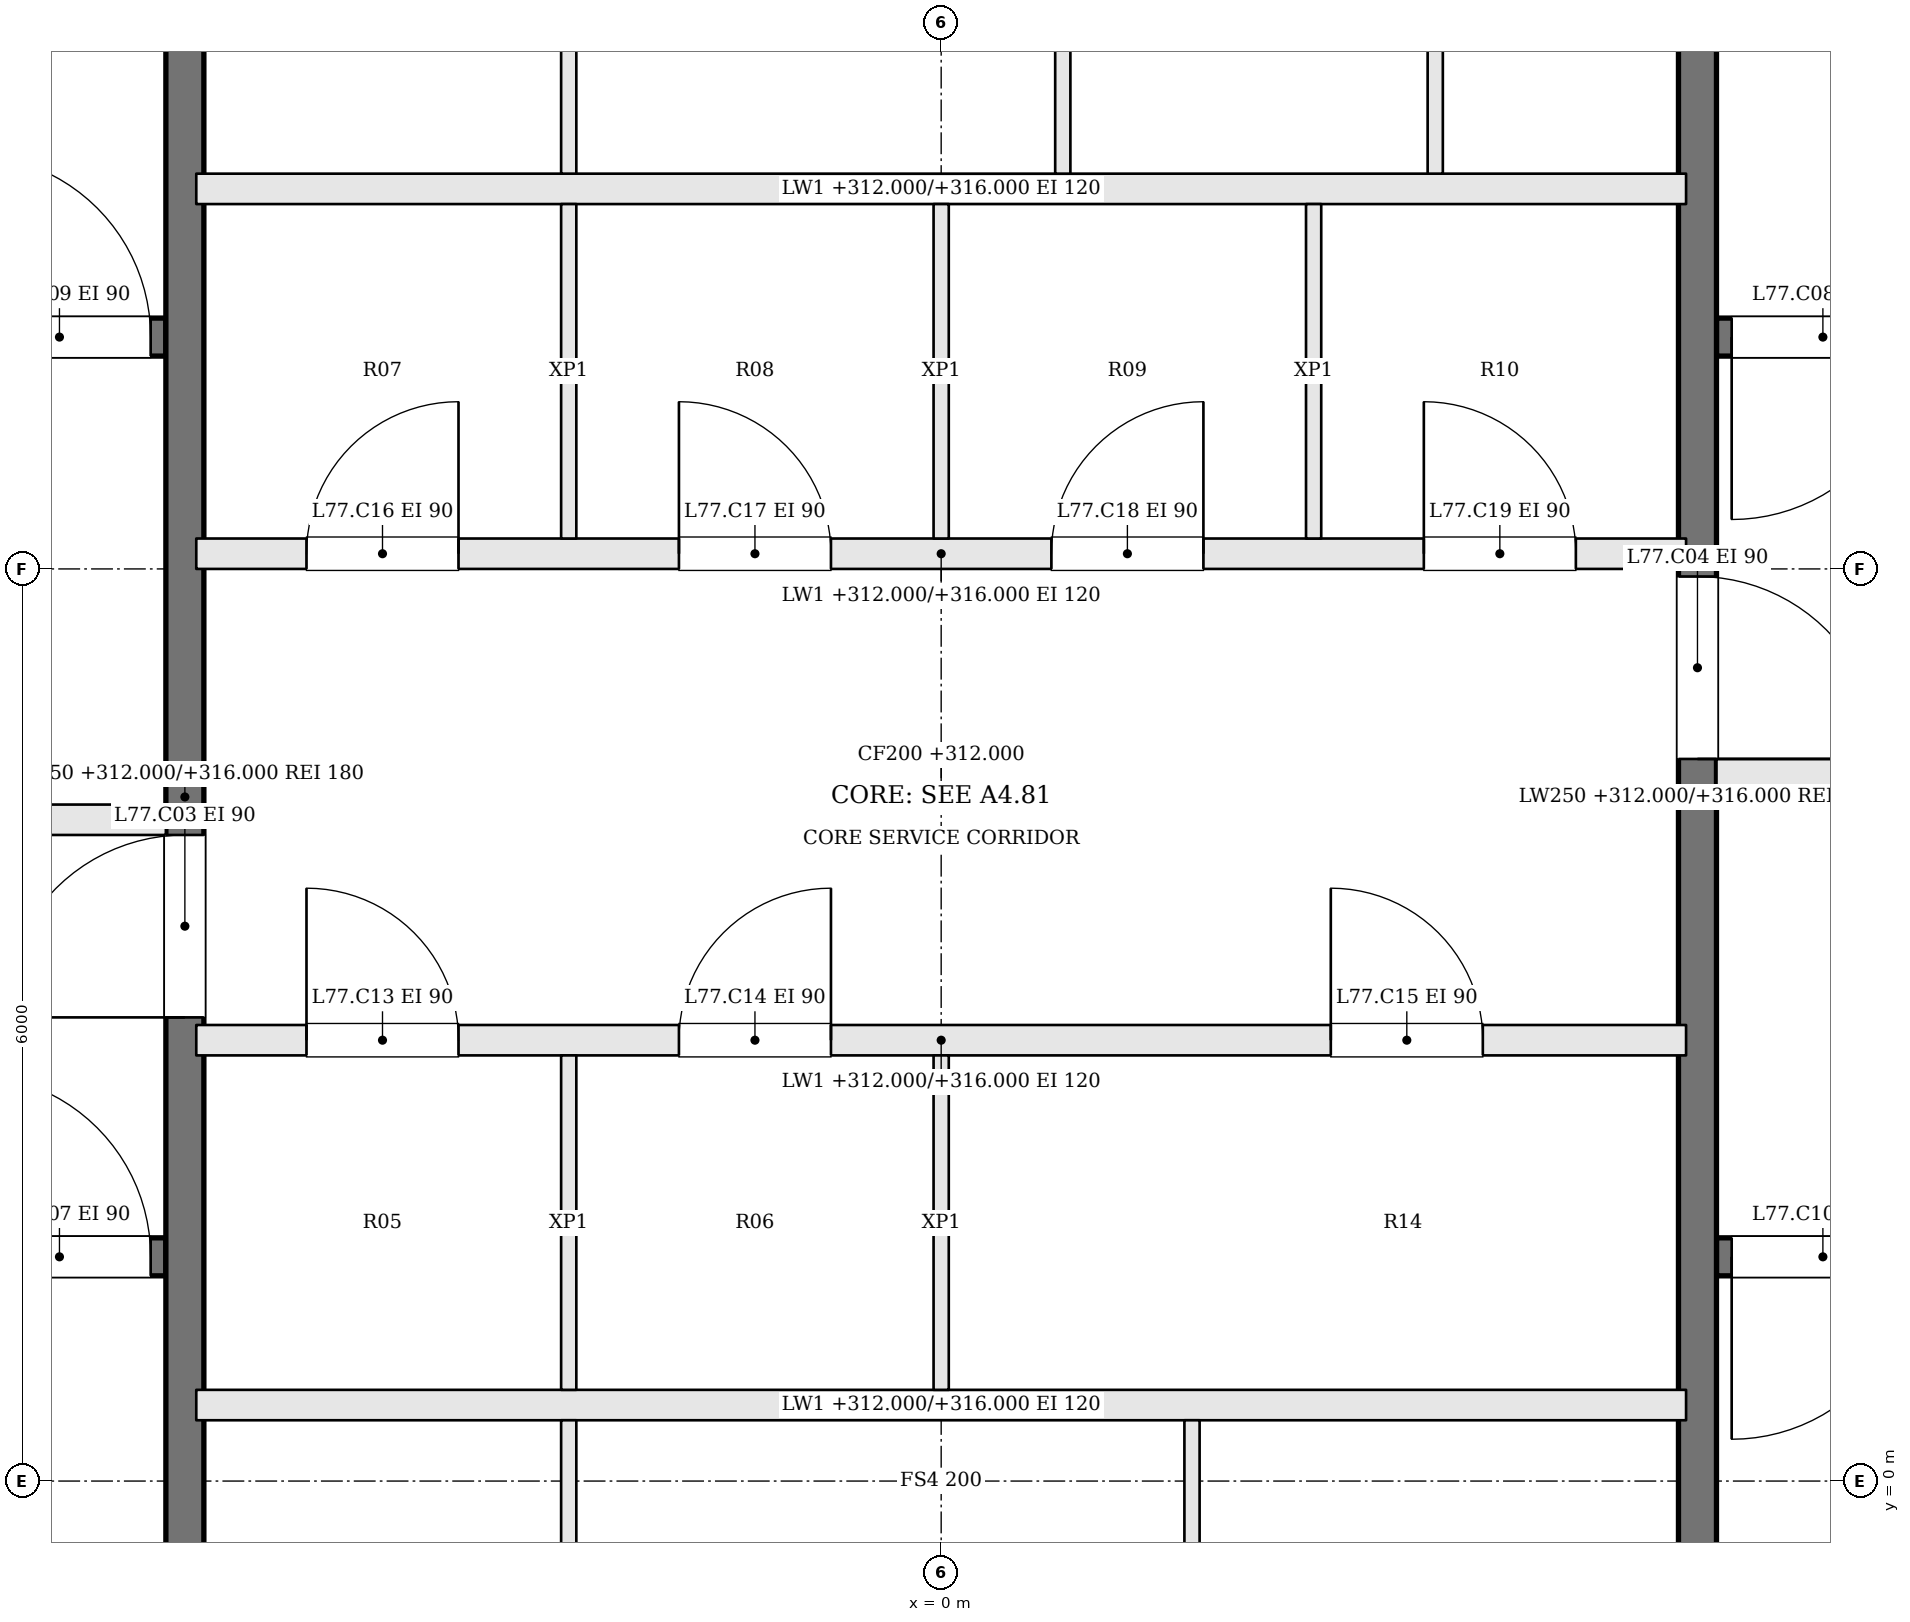
"""IFC4 building model, lengths in metres.
Left out: names, types, materials, properties, quantities, classifications, styles, units other than length and angle.
Written with IfcOpenShell. Run it as: python <this file> out.ifc"""

import sys

from ifc_helpers import new_model, si_unit, direction, frame, frame_2d, origin, place, context, subcontext, project, spatial, rectangle, extrude, element, fill, save


model = new_model("IFC4")
c1 = context("Model", 3, precision=1e-05, world=origin(), true_north=direction((0.0, 1.0)))
c2 = subcontext(c1, "Body", "Model", "MODEL_VIEW")
j1 = project(units=[si_unit("LENGTHUNIT", "METRE"), si_unit("PLANEANGLEUNIT", "RADIAN")], contexts=[c1])
p1 = place(None, origin())
s1 = spatial("IfcSite", under=j1, at=p1, CompositionType="ELEMENT")
p2 = place(p1, origin())
s2 = spatial("IfcBuilding", under=s1, at=p2, CompositionType="ELEMENT")
p3 = place(p2, frame((0.0, 0.0, 312.0)))
s3 = spatial("IfcBuildingStorey", under=s2, at=p3, CompositionType="ELEMENT", Elevation=312.0)
p4 = place(p3, frame((-12.2, 1.475, 0.0), z_axis=(0.0, 0.0, 1.0), x_axis=(1.0, 0.0, 0.0)))
e1 = element("IfcWall", 1, at=p4, inside=s3, PredefinedType="SOLIDWALL", context=c2, shape_type="SweptSolid", body=[
    extrude(rectangle(XDim=7.1, YDim=0.25, at=frame_2d((3.55, 0.0))), origin(), (0.0, 0.0, 1.0), 4.0),
])
p5 = place(p4, frame((5.8, 0.0, 0.0)))
e2 = element("IfcOpeningElement", 2, at=p5, cuts=e1, PredefinedType="OPENING", context=c2, shape_type="SweptSolid", body=[
    extrude(rectangle(XDim=1.2, YDim=2.1, at=frame_2d((0.6, 1.05))), frame((0.0, 0.135, 0.0), z_axis=(0.0, -1.0, 0.0), x_axis=(1.0, 0.0, 0.0)), (0.0, 0.0, 1.0), 0.27),
])
p6 = place(p3, frame((12.2, 7.525, 0.0), z_axis=(0.0, 0.0, 1.0), x_axis=(-1.0, 0.0, 0.0)))
e3 = element("IfcWall", 3, at=p6, inside=s3, PredefinedType="SOLIDWALL", context=c2, shape_type="SweptSolid", body=[
    extrude(rectangle(XDim=7.1, YDim=0.25, at=frame_2d((3.55, 0.0))), origin(), (0.0, 0.0, 1.0), 4.0),
])
p7 = place(p6, frame((5.8, 0.0, 0.0)))
e4 = element("IfcOpeningElement", 4, at=p7, cuts=e3, PredefinedType="OPENING", context=c2, shape_type="SweptSolid", body=[
    extrude(rectangle(XDim=1.2, YDim=2.1, at=frame_2d((0.6, 1.05))), frame((0.0, 0.135, 0.0), z_axis=(0.0, -1.0, 0.0), x_axis=(1.0, 0.0, 0.0)), (0.0, 0.0, 1.0), 0.27),
])
p8 = place(p3, frame((-12.2, 4.35, 0.0), z_axis=(0.0, 0.0, 1.0), x_axis=(1.0, 0.0, 0.0)))
e5 = element("IfcWall", 5, at=p8, inside=s3, PredefinedType="SOLIDWALL", context=c2, shape_type="SweptSolid", body=[
    extrude(rectangle(XDim=7.1, YDim=0.2, at=frame_2d((3.55, 0.0))), origin(), (0.0, 0.0, 1.0), 4.0),
])
p9 = place(p8, frame((4.4, 0.0, 0.0)))
e6 = element("IfcOpeningElement", 6, at=p9, cuts=e5, PredefinedType="OPENING", context=c2, shape_type="SweptSolid", body=[
    extrude(rectangle(XDim=1.2, YDim=2.1, at=frame_2d((0.6, 1.05))), frame((0.0, 0.11, 0.0), z_axis=(0.0, -1.0, 0.0), x_axis=(1.0, 0.0, 0.0)), (0.0, 0.0, 1.0), 0.22),
])
p10 = place(p8, frame((1.1, 0.0, 0.0)))
e7 = element("IfcOpeningElement", 7, at=p10, cuts=e5, PredefinedType="OPENING", context=c2, shape_type="SweptSolid", body=[
    extrude(rectangle(XDim=1.2, YDim=2.1, at=frame_2d((0.6, 1.05))), frame((0.0, 0.11, 0.0), z_axis=(0.0, -1.0, 0.0), x_axis=(1.0, 0.0, 0.0)), (0.0, 0.0, 1.0), 0.22),
])
p11 = place(p3, frame((12.2, 4.65, 0.0), z_axis=(0.0, 0.0, 1.0), x_axis=(-1.0, 0.0, 0.0)))
e8 = element("IfcWall", 8, at=p11, inside=s3, PredefinedType="SOLIDWALL", context=c2, shape_type="SweptSolid", body=[
    extrude(rectangle(XDim=7.1, YDim=0.2, at=frame_2d((3.55, 0.0))), origin(), (0.0, 0.0, 1.0), 4.0),
])
p12 = place(p11, frame((4.4, 0.0, 0.0)))
e9 = element("IfcOpeningElement", 9, at=p12, cuts=e8, PredefinedType="OPENING", context=c2, shape_type="SweptSolid", body=[
    extrude(rectangle(XDim=1.2, YDim=2.1, at=frame_2d((0.6, 1.05))), frame((0.0, 0.11, 0.0), z_axis=(0.0, -1.0, 0.0), x_axis=(1.0, 0.0, 0.0)), (0.0, 0.0, 1.0), 0.22),
])
p13 = place(p11, frame((1.1, 0.0, 0.0)))
e10 = element("IfcOpeningElement", 10, at=p13, cuts=e8, PredefinedType="OPENING", context=c2, shape_type="SweptSolid", body=[
    extrude(rectangle(XDim=1.2, YDim=2.1, at=frame_2d((0.6, 1.05))), frame((0.0, 0.11, 0.0), z_axis=(0.0, -1.0, 0.0), x_axis=(1.0, 0.0, 0.0)), (0.0, 0.0, 1.0), 0.22),
])
p14 = place(p3, frame((-12.2, 7.525, 0.0), z_axis=(0.0, 0.0, 1.0), x_axis=(1.0, 0.0, 0.0)))
e11 = element("IfcWall", 11, at=p14, inside=s3, PredefinedType="SOLIDWALL", context=c2, shape_type="SweptSolid", body=[
    extrude(rectangle(XDim=7.1, YDim=0.25, at=frame_2d((3.55, 0.0))), origin(), (0.0, 0.0, 1.0), 4.0),
])
p15 = place(p14, frame((5.8, 0.0, 0.0)))
e12 = element("IfcOpeningElement", 12, at=p15, cuts=e11, PredefinedType="OPENING", context=c2, shape_type="SweptSolid", body=[
    extrude(rectangle(XDim=1.2, YDim=2.1, at=frame_2d((0.6, 1.05))), frame((0.0, 0.135, 0.0), z_axis=(0.0, -1.0, 0.0), x_axis=(1.0, 0.0, 0.0)), (0.0, 0.0, 1.0), 0.27),
])
p16 = place(p3, frame((12.2, 1.475, 0.0), z_axis=(0.0, 0.0, 1.0), x_axis=(-1.0, 0.0, 0.0)))
e13 = element("IfcWall", 13, at=p16, inside=s3, PredefinedType="SOLIDWALL", context=c2, shape_type="SweptSolid", body=[
    extrude(rectangle(XDim=7.1, YDim=0.25, at=frame_2d((3.55, 0.0))), origin(), (0.0, 0.0, 1.0), 4.0),
])
p17 = place(p16, frame((5.8, 0.0, 0.0)))
e14 = element("IfcOpeningElement", 14, at=p17, cuts=e13, PredefinedType="OPENING", context=c2, shape_type="SweptSolid", body=[
    extrude(rectangle(XDim=1.2, YDim=2.1, at=frame_2d((0.6, 1.05))), frame((0.0, 0.135, 0.0), z_axis=(0.0, -1.0, 0.0), x_axis=(1.0, 0.0, 0.0)), (0.0, 0.0, 1.0), 0.27),
])
p18 = place(p3, frame((-4.975, -2.2, 0.0), z_axis=(0.0, 0.0, 1.0), x_axis=(0.0, 1.0, 0.0)))
e15 = element("IfcWall", 15, at=p18, inside=s3, PredefinedType="SOLIDWALL", context=c2, shape_type="SweptSolid", body=[
    extrude(rectangle(XDim=13.4, YDim=0.25, at=frame_2d((6.7, 0.0))), origin(), (0.0, 0.0, 1.0), 4.0),
])
p19 = place(p18, frame((5.25, 0.0, 0.0)))
e16 = element("IfcOpeningElement", 16, at=p19, cuts=e15, PredefinedType="OPENING", context=c2, shape_type="SweptSolid", body=[
    extrude(rectangle(XDim=1.2, YDim=2.1, at=frame_2d((0.6, 1.05))), frame((0.0, 0.135, 0.0), z_axis=(0.0, -1.0, 0.0), x_axis=(1.0, 0.0, 0.0)), (0.0, 0.0, 1.0), 0.27),
])
p20 = place(p3, frame((4.975, 11.2, 0.0), z_axis=(0.0, 0.0, 1.0), x_axis=(0.0, -1.0, 0.0)))
e17 = element("IfcWall", 17, at=p20, inside=s3, PredefinedType="SOLIDWALL", context=c2, shape_type="SweptSolid", body=[
    extrude(rectangle(XDim=13.4, YDim=0.25, at=frame_2d((6.7, 0.0))), origin(), (0.0, 0.0, 1.0), 4.0),
])
p21 = place(p20, frame((5.25, 0.0, 0.0)))
e18 = element("IfcOpeningElement", 18, at=p21, cuts=e17, PredefinedType="OPENING", context=c2, shape_type="SweptSolid", body=[
    extrude(rectangle(XDim=1.2, YDim=2.1, at=frame_2d((0.6, 1.05))), frame((0.0, 0.135, 0.0), z_axis=(0.0, -1.0, 0.0), x_axis=(1.0, 0.0, 0.0)), (0.0, 0.0, 1.0), 0.27),
])
p22 = place(p3, frame((-4.9, 0.5, 0.0), z_axis=(0.0, 0.0, 1.0), x_axis=(1.0, 0.0, 0.0)))
e19 = element("IfcWall", 19, at=p22, inside=s3, PredefinedType="SOLIDWALL", context=c2, shape_type="SweptSolid", body=[
    extrude(rectangle(XDim=9.8, YDim=0.2, at=frame_2d((4.9, 0.0))), origin(), (0.0, 0.0, 1.0), 4.0),
])
p23 = place(p3, frame((-4.9, 2.9, 0.0), z_axis=(0.0, 0.0, 1.0), x_axis=(1.0, 0.0, 0.0)))
e20 = element("IfcWall", 20, at=p23, inside=s3, PredefinedType="SOLIDWALL", context=c2, shape_type="SweptSolid", body=[
    extrude(rectangle(XDim=9.8, YDim=0.2, at=frame_2d((4.9, 0.0))), origin(), (0.0, 0.0, 1.0), 4.0),
])
p24 = place(p23, frame((0.725, 0.0, 0.0)))
e21 = element("IfcOpeningElement", 21, at=p24, cuts=e20, PredefinedType="OPENING", context=c2, shape_type="SweptSolid", body=[
    extrude(rectangle(XDim=1.0, YDim=2.1, at=frame_2d((0.5, 1.05))), frame((0.0, 0.11, 0.0), z_axis=(0.0, -1.0, 0.0), x_axis=(1.0, 0.0, 0.0)), (0.0, 0.0, 1.0), 0.22),
])
p25 = place(p23, frame((3.175, 0.0, 0.0)))
e22 = element("IfcOpeningElement", 22, at=p25, cuts=e20, PredefinedType="OPENING", context=c2, shape_type="SweptSolid", body=[
    extrude(rectangle(XDim=1.0, YDim=2.1, at=frame_2d((0.5, 1.05))), frame((0.0, 0.11, 0.0), z_axis=(0.0, -1.0, 0.0), x_axis=(1.0, 0.0, 0.0)), (0.0, 0.0, 1.0), 0.22),
])
p26 = place(p23, frame((7.463, 0.0, 0.0)))
e23 = element("IfcOpeningElement", 23, at=p26, cuts=e20, PredefinedType="OPENING", context=c2, shape_type="SweptSolid", body=[
    extrude(rectangle(XDim=1.0, YDim=2.1, at=frame_2d((0.5, 1.05))), frame((0.0, 0.11, 0.0), z_axis=(0.0, -1.0, 0.0), x_axis=(1.0, 0.0, 0.0)), (0.0, 0.0, 1.0), 0.22),
])
p27 = place(p3, frame((-4.9, 6.1, 0.0), z_axis=(0.0, 0.0, 1.0), x_axis=(1.0, 0.0, 0.0)))
e24 = element("IfcWall", 24, at=p27, inside=s3, PredefinedType="SOLIDWALL", context=c2, shape_type="SweptSolid", body=[
    extrude(rectangle(XDim=9.8, YDim=0.2, at=frame_2d((4.9, 0.0))), origin(), (0.0, 0.0, 1.0), 4.0),
])
p28 = place(p27, frame((0.725, 0.0, 0.0)))
e25 = element("IfcOpeningElement", 25, at=p28, cuts=e24, PredefinedType="OPENING", context=c2, shape_type="SweptSolid", body=[
    extrude(rectangle(XDim=1.0, YDim=2.1, at=frame_2d((0.5, 1.05))), frame((0.0, 0.11, 0.0), z_axis=(0.0, -1.0, 0.0), x_axis=(1.0, 0.0, 0.0)), (0.0, 0.0, 1.0), 0.22),
])
p29 = place(p27, frame((3.175, 0.0, 0.0)))
e26 = element("IfcOpeningElement", 26, at=p29, cuts=e24, PredefinedType="OPENING", context=c2, shape_type="SweptSolid", body=[
    extrude(rectangle(XDim=1.0, YDim=2.1, at=frame_2d((0.5, 1.05))), frame((0.0, 0.11, 0.0), z_axis=(0.0, -1.0, 0.0), x_axis=(1.0, 0.0, 0.0)), (0.0, 0.0, 1.0), 0.22),
])
p30 = place(p27, frame((5.625, 0.0, 0.0)))
e27 = element("IfcOpeningElement", 27, at=p30, cuts=e24, PredefinedType="OPENING", context=c2, shape_type="SweptSolid", body=[
    extrude(rectangle(XDim=1.0, YDim=2.1, at=frame_2d((0.5, 1.05))), frame((0.0, 0.11, 0.0), z_axis=(0.0, -1.0, 0.0), x_axis=(1.0, 0.0, 0.0)), (0.0, 0.0, 1.0), 0.22),
])
p31 = place(p27, frame((8.075, 0.0, 0.0)))
e28 = element("IfcOpeningElement", 28, at=p31, cuts=e24, PredefinedType="OPENING", context=c2, shape_type="SweptSolid", body=[
    extrude(rectangle(XDim=1.0, YDim=2.1, at=frame_2d((0.5, 1.05))), frame((0.0, 0.11, 0.0), z_axis=(0.0, -1.0, 0.0), x_axis=(1.0, 0.0, 0.0)), (0.0, 0.0, 1.0), 0.22),
])
p32 = place(p3, frame((-4.9, 8.5, 0.0), z_axis=(0.0, 0.0, 1.0), x_axis=(1.0, 0.0, 0.0)))
e29 = element("IfcWall", 29, at=p32, inside=s3, PredefinedType="SOLIDWALL", context=c2, shape_type="SweptSolid", body=[
    extrude(rectangle(XDim=9.8, YDim=0.2, at=frame_2d((4.9, 0.0))), origin(), (0.0, 0.0, 1.0), 4.0),
])
for number, where, z_axis, x_axis in (
    (30, (-2.45, 0.6, 0.0), (0.0, 0.0, 1.0), (0.0, 1.0, 0.0)),
    (31, (0.0, 0.6, 0.0), (0.0, 0.0, 1.0), (0.0, 1.0, 0.0)),
    (32, (-2.45, 6.2, 0.0), (0.0, 0.0, 1.0), (0.0, 1.0, 0.0)),
    (33, (0.0, 6.2, 0.0), (0.0, 0.0, 1.0), (0.0, 1.0, 0.0)),
    (34, (2.45, 6.2, 0.0), (0.0, 0.0, 1.0), (0.0, 1.0, 0.0)),
):
    element("IfcWall", number, at=place(p3, frame(where, z_axis=z_axis, x_axis=x_axis)), inside=s3, PredefinedType="PARTITIONING", context=c2, shape_type="SweptSolid", body=[
        extrude(rectangle(XDim=2.2, YDim=0.1, at=frame_2d((1.1, 0.0))), origin(), (0.0, 0.0, 1.0), 4.0),
    ])
for number, where, z_axis, x_axis in (
    (35, (-2.45, -2.2, 0.0), (0.0, 0.0, 1.0), (0.0, 1.0, 0.0)),
    (36, (1.65, -2.2, 0.0), (0.0, 0.0, 1.0), (0.0, 1.0, 0.0)),
    (37, (-2.45, 8.6, 0.0), (0.0, 0.0, 1.0), (0.0, 1.0, 0.0)),
    (38, (0.8, 8.6, 0.0), (0.0, 0.0, 1.0), (0.0, 1.0, 0.0)),
    (39, (3.25, 8.6, 0.0), (0.0, 0.0, 1.0), (0.0, 1.0, 0.0)),
):
    element("IfcWall", number, at=place(p3, frame(where, z_axis=z_axis, x_axis=x_axis)), inside=s3, PredefinedType="PARTITIONING", context=c2, shape_type="SweptSolid", body=[
        extrude(rectangle(XDim=2.6, YDim=0.1, at=frame_2d((1.3, 0.0))), origin(), (0.0, 0.0, 1.0), 4.0),
    ])
p33 = place(p19, origin())
e40 = element("IfcDoor", 40, at=p33, inside=s3, OperationType="SINGLE_SWING_LEFT", PredefinedType="DOOR", context=c2, shape_type="SweptSolid", body=[
    extrude(rectangle(XDim=1.2, YDim=2.1, at=frame_2d((0.6, 1.05))), frame((0.0, 0.025, 0.0), z_axis=(0.0, -1.0, 0.0), x_axis=(1.0, 0.0, 0.0)), (0.0, 0.0, 1.0), 0.05),
])
fill(e16, e40)
p34 = place(p21, origin())
e41 = element("IfcDoor", 41, at=p34, inside=s3, OperationType="SINGLE_SWING_RIGHT", PredefinedType="DOOR", context=c2, shape_type="SweptSolid", body=[
    extrude(rectangle(XDim=1.2, YDim=2.1, at=frame_2d((0.6, 1.05))), frame((0.0, 0.025, 0.0), z_axis=(0.0, -1.0, 0.0), x_axis=(1.0, 0.0, 0.0)), (0.0, 0.0, 1.0), 0.05),
])
fill(e18, e41)
p35 = place(p5, origin())
e42 = element("IfcDoor", 42, at=p35, inside=s3, OperationType="SINGLE_SWING_LEFT", PredefinedType="DOOR", context=c2, shape_type="SweptSolid", body=[
    extrude(rectangle(XDim=1.2, YDim=2.1, at=frame_2d((0.6, 1.05))), frame((0.0, 0.025, 0.0), z_axis=(0.0, -1.0, 0.0), x_axis=(1.0, 0.0, 0.0)), (0.0, 0.0, 1.0), 0.05),
])
fill(e2, e42)
p36 = place(p7, origin())
e43 = element("IfcDoor", 43, at=p36, inside=s3, OperationType="SINGLE_SWING_RIGHT", PredefinedType="DOOR", context=c2, shape_type="SweptSolid", body=[
    extrude(rectangle(XDim=1.2, YDim=2.1, at=frame_2d((0.6, 1.05))), frame((0.0, 0.025, 0.0), z_axis=(0.0, -1.0, 0.0), x_axis=(1.0, 0.0, 0.0)), (0.0, 0.0, 1.0), 0.05),
])
fill(e4, e43)
p37 = place(p15, origin())
e44 = element("IfcDoor", 44, at=p37, inside=s3, OperationType="SINGLE_SWING_LEFT", PredefinedType="DOOR", context=c2, shape_type="SweptSolid", body=[
    extrude(rectangle(XDim=1.2, YDim=2.1, at=frame_2d((0.6, 1.05))), frame((0.0, 0.025, 0.0), z_axis=(0.0, -1.0, 0.0), x_axis=(1.0, 0.0, 0.0)), (0.0, 0.0, 1.0), 0.05),
])
fill(e12, e44)
p38 = place(p17, origin())
e45 = element("IfcDoor", 45, at=p38, inside=s3, OperationType="SINGLE_SWING_RIGHT", PredefinedType="DOOR", context=c2, shape_type="SweptSolid", body=[
    extrude(rectangle(XDim=1.2, YDim=2.1, at=frame_2d((0.6, 1.05))), frame((0.0, 0.025, 0.0), z_axis=(0.0, -1.0, 0.0), x_axis=(1.0, 0.0, 0.0)), (0.0, 0.0, 1.0), 0.05),
])
fill(e14, e45)
p39 = place(p24, origin())
e46 = element("IfcDoor", 46, at=p39, inside=s3, OperationType="SINGLE_SWING_LEFT", PredefinedType="DOOR", context=c2, shape_type="SweptSolid", body=[
    extrude(rectangle(XDim=1.0, YDim=2.1, at=frame_2d((0.5, 1.05))), frame((0.0, 0.025, 0.0), z_axis=(0.0, -1.0, 0.0), x_axis=(1.0, 0.0, 0.0)), (0.0, 0.0, 1.0), 0.05),
])
fill(e21, e46)
p40 = place(p25, origin())
e47 = element("IfcDoor", 47, at=p40, inside=s3, OperationType="SINGLE_SWING_RIGHT", PredefinedType="DOOR", context=c2, shape_type="SweptSolid", body=[
    extrude(rectangle(XDim=1.0, YDim=2.1, at=frame_2d((0.5, 1.05))), frame((0.0, 0.025, 0.0), z_axis=(0.0, -1.0, 0.0), x_axis=(1.0, 0.0, 0.0)), (0.0, 0.0, 1.0), 0.05),
])
fill(e22, e47)
p41 = place(p26, origin())
e48 = element("IfcDoor", 48, at=p41, inside=s3, OperationType="SINGLE_SWING_LEFT", PredefinedType="DOOR", context=c2, shape_type="SweptSolid", body=[
    extrude(rectangle(XDim=1.0, YDim=2.1, at=frame_2d((0.5, 1.05))), frame((0.0, 0.025, 0.0), z_axis=(0.0, -1.0, 0.0), x_axis=(1.0, 0.0, 0.0)), (0.0, 0.0, 1.0), 0.05),
])
fill(e23, e48)
p42 = place(p28, origin())
e49 = element("IfcDoor", 49, at=p42, inside=s3, OperationType="SINGLE_SWING_RIGHT", PredefinedType="DOOR", context=c2, shape_type="SweptSolid", body=[
    extrude(rectangle(XDim=1.0, YDim=2.1, at=frame_2d((0.5, 1.05))), frame((0.0, 0.025, 0.0), z_axis=(0.0, -1.0, 0.0), x_axis=(1.0, 0.0, 0.0)), (0.0, 0.0, 1.0), 0.05),
])
fill(e25, e49)
p43 = place(p29, origin())
e50 = element("IfcDoor", 50, at=p43, inside=s3, OperationType="SINGLE_SWING_LEFT", PredefinedType="DOOR", context=c2, shape_type="SweptSolid", body=[
    extrude(rectangle(XDim=1.0, YDim=2.1, at=frame_2d((0.5, 1.05))), frame((0.0, 0.025, 0.0), z_axis=(0.0, -1.0, 0.0), x_axis=(1.0, 0.0, 0.0)), (0.0, 0.0, 1.0), 0.05),
])
fill(e26, e50)
p44 = place(p30, origin())
e51 = element("IfcDoor", 51, at=p44, inside=s3, OperationType="SINGLE_SWING_RIGHT", PredefinedType="DOOR", context=c2, shape_type="SweptSolid", body=[
    extrude(rectangle(XDim=1.0, YDim=2.1, at=frame_2d((0.5, 1.05))), frame((0.0, 0.025, 0.0), z_axis=(0.0, -1.0, 0.0), x_axis=(1.0, 0.0, 0.0)), (0.0, 0.0, 1.0), 0.05),
])
fill(e27, e51)
p45 = place(p31, origin())
e52 = element("IfcDoor", 52, at=p45, inside=s3, OperationType="SINGLE_SWING_LEFT", PredefinedType="DOOR", context=c2, shape_type="SweptSolid", body=[
    extrude(rectangle(XDim=1.0, YDim=2.1, at=frame_2d((0.5, 1.05))), frame((0.0, 0.025, 0.0), z_axis=(0.0, -1.0, 0.0), x_axis=(1.0, 0.0, 0.0)), (0.0, 0.0, 1.0), 0.05),
])
fill(e28, e52)
save(model, sys.argv[1])
